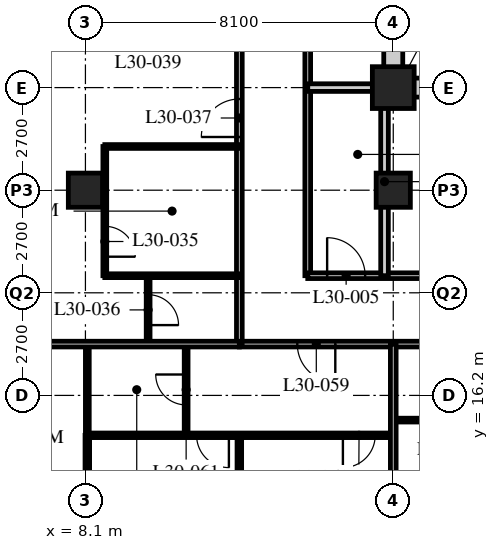
"""IFC4 building model, lengths in metres.
Left out: names, types, materials, properties, quantities, classifications, styles, units other than length and angle.
Written with IfcOpenShell. Run it as: python <this file> out.ifc"""

import sys

from ifc_helpers import new_model, si_unit, direction, frame, frame_2d, origin, origin_2d, place, context, subcontext, project, spatial, rectangle, hollow_rectangle, extrude, element, fill, save


model = new_model("IFC4")
c1 = context("Model", 3, precision=1e-05, world=origin(), true_north=direction((0.0, 1.0)))
c2 = subcontext(c1, "Body", "Model", "MODEL_VIEW")
j1 = project(units=[si_unit("LENGTHUNIT", "METRE"), si_unit("PLANEANGLEUNIT", "RADIAN")], contexts=[c1])
p1 = place(None, origin())
s1 = spatial("IfcSite", under=j1, at=p1, CompositionType="ELEMENT")
p2 = place(p1, origin())
s2 = spatial("IfcBuilding", under=s1, at=p2, CompositionType="ELEMENT")
p3 = place(p2, frame((0.0, 0.0, 120.4)))
s3 = spatial("IfcBuildingStorey", under=s2, at=p3, CompositionType="ELEMENT", Elevation=120.4)
for number, where, z_axis, x_axis in (
    (1, (8.1, 21.6, 0.0), (0.0, 0.0, 1.0), (1.0, 0.0, 0.0)),
    (2, (16.2, 21.6, 0.0), (0.0, 0.0, 1.0), (1.0, 0.0, 0.0)),
):
    element("IfcColumn", number, at=place(p3, frame(where, z_axis=z_axis, x_axis=x_axis)), inside=s3, PredefinedType="COLUMN", context=c2, shape_type="SweptSolid", body=[
        extrude(hollow_rectangle(XDim=0.9, YDim=0.9, WallThickness=0.09, at=origin_2d()), origin(), (0.0, 0.0, 1.0), 3.4),
    ])
p4 = place(p3, frame((16.2, 24.3, 0.0), z_axis=(0.0, 0.0, 1.0), x_axis=(1.0, 0.0, 0.0)))
e3 = element("IfcColumn", 3, at=p4, inside=s3, PredefinedType="COLUMN", context=c2, shape_type="SweptSolid", body=[
    extrude(hollow_rectangle(XDim=1.1, YDim=1.1, WallThickness=0.1, at=origin_2d()), origin(), (0.0, 0.0, 1.0), 3.4),
])
p5 = place(p3, frame((12.15, 17.55, 0.0), z_axis=(0.0, 0.0, 1.0), x_axis=(1.0, 0.0, 0.0)))
e4 = element("IfcWall", 4, at=p5, inside=s3, PredefinedType="PARTITIONING", context=c2, shape_type="SweptSolid", body=[
    extrude(rectangle(XDim=32.4, YDim=0.15, at=frame_2d((16.2, 0.0))), origin(), (0.0, 0.0, 1.0), 3.19),
])
p6 = place(p5, frame((5.95, 0.0, 0.0)))
e5 = element("IfcOpeningElement", 5, at=p6, cuts=e4, PredefinedType="OPENING", context=c2, shape_type="SweptSolid", body=[
    extrude(rectangle(XDim=1.0, YDim=2.1, at=frame_2d((0.5, 1.05))), frame((0.0, 0.085, 0.0), z_axis=(0.0, -1.0, 0.0), x_axis=(1.0, 0.0, 0.0)), (0.0, 0.0, 1.0), 0.17),
])
p7 = place(p5, frame((17.725, 0.0, 0.0)))
e6 = element("IfcOpeningElement", 6, at=p7, cuts=e4, PredefinedType="OPENING", context=c2, shape_type="SweptSolid", body=[
    extrude(rectangle(XDim=1.0, YDim=2.1, at=frame_2d((0.5, 1.05))), frame((0.0, 0.085, 0.0), z_axis=(0.0, -1.0, 0.0), x_axis=(1.0, 0.0, 0.0)), (0.0, 0.0, 1.0), 0.17),
])
p8 = place(p5, frame((26.75, 0.0, 0.0)))
e7 = element("IfcOpeningElement", 7, at=p8, cuts=e4, PredefinedType="OPENING", context=c2, shape_type="SweptSolid", body=[
    extrude(rectangle(XDim=1.0, YDim=2.1, at=frame_2d((0.5, 1.05))), frame((0.0, 0.085, 0.0), z_axis=(0.0, -1.0, 0.0), x_axis=(1.0, 0.0, 0.0)), (0.0, 0.0, 1.0), 0.17),
])
p9 = place(p5, frame((1.525, 0.0, 0.0)))
e8 = element("IfcOpeningElement", 8, at=p9, cuts=e4, PredefinedType="OPENING", context=c2, shape_type="SweptSolid", body=[
    extrude(rectangle(XDim=1.0, YDim=2.1, at=frame_2d((0.5, 1.05))), frame((0.0, 0.085, 0.0), z_axis=(0.0, -1.0, 0.0), x_axis=(1.0, 0.0, 0.0)), (0.0, 0.0, 1.0), 0.17),
])
p10 = place(p5, frame((29.875, 0.0, 0.0)))
e9 = element("IfcOpeningElement", 9, at=p10, cuts=e4, PredefinedType="OPENING", context=c2, shape_type="SweptSolid", body=[
    extrude(rectangle(XDim=1.0, YDim=2.1, at=frame_2d((0.5, 1.05))), frame((0.0, 0.085, 0.0), z_axis=(0.0, -1.0, 0.0), x_axis=(1.0, 0.0, 0.0)), (0.0, 0.0, 1.0), 0.17),
])
p11 = place(p3, frame((12.15, 17.55, 0.0), z_axis=(0.0, 0.0, 1.0), x_axis=(0.0, 1.0, 0.0)))
e10 = element("IfcWall", 10, at=p11, inside=s3, PredefinedType="PARTITIONING", context=c2, shape_type="SweptSolid", body=[
    extrude(rectangle(XDim=28.35, YDim=0.15, at=frame_2d((14.175, 0.0))), origin(), (0.0, 0.0, 1.0), 3.19),
])
p12 = place(p11, frame((5.45, 0.0, 0.0)))
e11 = element("IfcOpeningElement", 11, at=p12, cuts=e10, PredefinedType="OPENING", context=c2, shape_type="SweptSolid", body=[
    extrude(rectangle(XDim=1.0, YDim=2.1, at=frame_2d((0.5, 1.05))), frame((0.0, 0.085, 0.0), z_axis=(0.0, -1.0, 0.0), x_axis=(1.0, 0.0, 0.0)), (0.0, 0.0, 1.0), 0.17),
])
p13 = place(p11, frame((13.55, 0.0, 0.0)))
e12 = element("IfcOpeningElement", 12, at=p13, cuts=e10, PredefinedType="OPENING", context=c2, shape_type="SweptSolid", body=[
    extrude(rectangle(XDim=1.0, YDim=2.1, at=frame_2d((0.5, 1.05))), frame((0.0, 0.085, 0.0), z_axis=(0.0, -1.0, 0.0), x_axis=(1.0, 0.0, 0.0)), (0.0, 0.0, 1.0), 0.17),
])
p14 = place(p11, frame((21.65, 0.0, 0.0)))
e13 = element("IfcOpeningElement", 13, at=p14, cuts=e10, PredefinedType="OPENING", context=c2, shape_type="SweptSolid", body=[
    extrude(rectangle(XDim=1.0, YDim=2.1, at=frame_2d((0.5, 1.05))), frame((0.0, 0.085, 0.0), z_axis=(0.0, -1.0, 0.0), x_axis=(1.0, 0.0, 0.0)), (0.0, 0.0, 1.0), 0.17),
])
p15 = place(p11, frame((26.75, 0.0, 0.0)))
e14 = element("IfcOpeningElement", 14, at=p15, cuts=e10, PredefinedType="OPENING", context=c2, shape_type="SweptSolid", body=[
    extrude(rectangle(XDim=1.0, YDim=2.1, at=frame_2d((0.5, 1.05))), frame((0.0, 0.085, 0.0), z_axis=(0.0, -1.0, 0.0), x_axis=(1.0, 0.0, 0.0)), (0.0, 0.0, 1.0), 0.17),
])
p16 = place(p3, frame((13.95, 44.1, 0.0), z_axis=(0.0, 0.0, 1.0), x_axis=(0.0, -1.0, 0.0)))
e15 = element("IfcWall", 15, at=p16, inside=s3, PredefinedType="PARTITIONING", context=c2, shape_type="SweptSolid", body=[
    extrude(rectangle(XDim=24.75, YDim=0.15, at=frame_2d((12.375, 0.0))), origin(), (0.0, 0.0, 1.0), 3.19),
])
p17 = place(p16, frame((15.25, 0.0, 0.0)))
e16 = element("IfcOpeningElement", 16, at=p17, cuts=e15, PredefinedType="OPENING", context=c2, shape_type="SweptSolid", body=[
    extrude(rectangle(XDim=1.0, YDim=2.1, at=frame_2d((0.5, 1.05))), frame((0.0, 0.085, 0.0), z_axis=(0.0, -1.0, 0.0), x_axis=(1.0, 0.0, 0.0)), (0.0, 0.0, 1.0), 0.17),
])
p18 = place(p16, frame((7.15, 0.0, 0.0)))
e17 = element("IfcOpeningElement", 17, at=p18, cuts=e15, PredefinedType="OPENING", context=c2, shape_type="SweptSolid", body=[
    extrude(rectangle(XDim=1.0, YDim=2.1, at=frame_2d((0.5, 1.05))), frame((0.0, 0.085, 0.0), z_axis=(0.0, -1.0, 0.0), x_axis=(1.0, 0.0, 0.0)), (0.0, 0.0, 1.0), 0.17),
])
p19 = place(p3, frame((13.95, 19.35, 0.0), z_axis=(0.0, 0.0, 1.0), x_axis=(1.0, 0.0, 0.0)))
e18 = element("IfcWall", 18, at=p19, inside=s3, PredefinedType="PARTITIONING", context=c2, shape_type="SweptSolid", body=[
    extrude(rectangle(XDim=13.19, YDim=0.15, at=frame_2d((6.595, 0.0))), origin(), (0.0, 0.0, 1.0), 3.19),
])
p20 = place(p19, frame((0.51, 0.0, 0.0)))
e19 = element("IfcOpeningElement", 19, at=p20, cuts=e18, PredefinedType="OPENING", context=c2, shape_type="SweptSolid", body=[
    extrude(rectangle(XDim=1.0, YDim=2.1, at=frame_2d((0.5, 1.05))), frame((0.0, 0.085, 0.0), z_axis=(0.0, -1.0, 0.0), x_axis=(1.0, 0.0, 0.0)), (0.0, 0.0, 1.0), 0.17),
])
p21 = place(p19, frame((7.11, 0.0, 0.0)))
e20 = element("IfcOpeningElement", 20, at=p21, cuts=e18, PredefinedType="OPENING", context=c2, shape_type="SweptSolid", body=[
    extrude(rectangle(XDim=1.0, YDim=2.1, at=frame_2d((0.5, 1.05))), frame((0.0, 0.085, 0.0), z_axis=(0.0, -1.0, 0.0), x_axis=(1.0, 0.0, 0.0)), (0.0, 0.0, 1.0), 0.17),
])
p22 = place(p3, frame((15.97, 19.35, 0.0), z_axis=(0.0, 0.0, 1.0), x_axis=(0.0, 1.0, 0.0)))
e21 = element("IfcWall", 21, at=p22, inside=s3, PredefinedType="SOLIDWALL", context=c2, shape_type="SweptSolid", body=[
    extrude(rectangle(XDim=4.95, YDim=0.2, at=frame_2d((2.475, 0.0))), origin(), (0.0, 0.0, 1.0), 2.49),
])
p23 = place(p3, frame((13.95, 24.3, 0.0), z_axis=(0.0, 0.0, 1.0), x_axis=(1.0, 0.0, 0.0)))
e22 = element("IfcWall", 22, at=p23, inside=s3, PredefinedType="SOLIDWALL", context=c2, shape_type="SweptSolid", body=[
    extrude(rectangle(XDim=2.25, YDim=0.2, at=frame_2d((1.125, 0.0))), origin(), (0.0, 0.0, 1.0), 3.19),
])
p24 = place(p3, frame((16.2, 15.55, 0.0), z_axis=(0.0, 0.0, 1.0), x_axis=(1.0, 0.0, 0.0)))
e23 = element("IfcWall", 23, at=p24, inside=s3, PredefinedType="PARTITIONING", context=c2, shape_type="SweptSolid", body=[
    extrude(rectangle(XDim=1.5, YDim=0.1, at=frame_2d((0.75, 0.0))), origin(), (0.0, 0.0, 1.0), 3.19),
])
p25 = place(p3, frame((8.61, 19.35, 0.0), z_axis=(0.0, 0.0, 1.0), x_axis=(0.0, 1.0, 0.0)))
e24 = element("IfcWall", 24, at=p25, inside=s3, PredefinedType="PARTITIONING", context=c2, shape_type="SweptSolid", body=[
    extrude(rectangle(XDim=3.4, YDim=0.1, at=frame_2d((1.7, 0.0))), origin(), (0.0, 0.0, 1.0), 3.19),
])
p26 = place(p25, frame((0.5, 0.0, 0.0)))
e25 = element("IfcOpeningElement", 25, at=p26, cuts=e24, PredefinedType="OPENING", context=c2, shape_type="SweptSolid", body=[
    extrude(rectangle(XDim=0.8, YDim=2.1, at=frame_2d((0.4, 1.05))), frame((0.0, 0.06, 0.0), z_axis=(0.0, -1.0, 0.0), x_axis=(1.0, 0.0, 0.0)), (0.0, 0.0, 1.0), 0.12),
])
p27 = place(p3, frame((9.75, 17.55, 0.0), z_axis=(0.0, 0.0, 1.0), x_axis=(0.0, 1.0, 0.0)))
e26 = element("IfcWall", 26, at=p27, inside=s3, PredefinedType="PARTITIONING", context=c2, shape_type="SweptSolid", body=[
    extrude(rectangle(XDim=1.8, YDim=0.1, at=frame_2d((0.9, 0.0))), origin(), (0.0, 0.0, 1.0), 3.19),
])
p28 = place(p27, frame((0.5, 0.0, 0.0)))
e27 = element("IfcOpeningElement", 27, at=p28, cuts=e26, PredefinedType="OPENING", context=c2, shape_type="SweptSolid", body=[
    extrude(rectangle(XDim=0.8, YDim=2.1, at=frame_2d((0.4, 1.05))), frame((0.0, 0.06, 0.0), z_axis=(0.0, -1.0, 0.0), x_axis=(1.0, 0.0, 0.0)), (0.0, 0.0, 1.0), 0.12),
])
for number, where, z_axis, x_axis in (
    (28, (12.15, 19.35, 0.0), (0.0, 0.0, 1.0), (-1.0, 0.0, 0.0)),
    (29, (12.15, 22.75, 0.0), (0.0, 0.0, 1.0), (-1.0, 0.0, 0.0)),
):
    element("IfcWall", number, at=place(p3, frame(where, z_axis=z_axis, x_axis=x_axis)), inside=s3, PredefinedType="PARTITIONING", context=c2, shape_type="SweptSolid", body=[
        extrude(rectangle(XDim=3.54, YDim=0.1, at=frame_2d((1.77, 0.0))), origin(), (0.0, 0.0, 1.0), 3.19),
    ])
p29 = place(p3, frame((10.75, 17.55, 0.0), z_axis=(0.0, 0.0, 1.0), x_axis=(0.0, -1.0, 0.0)))
e30 = element("IfcWall", 30, at=p29, inside=s3, PredefinedType="PARTITIONING", context=c2, shape_type="SweptSolid", body=[
    extrude(rectangle(XDim=2.4, YDim=0.1, at=frame_2d((1.2, 0.0))), origin(), (0.0, 0.0, 1.0), 3.19),
])
p30 = place(p29, frame((0.8, 0.0, 0.0)))
e31 = element("IfcOpeningElement", 31, at=p30, cuts=e30, PredefinedType="OPENING", context=c2, shape_type="SweptSolid", body=[
    extrude(rectangle(XDim=0.8, YDim=2.1, at=frame_2d((0.4, 1.05))), frame((0.0, 0.06, 0.0), z_axis=(0.0, -1.0, 0.0), x_axis=(1.0, 0.0, 0.0)), (0.0, 0.0, 1.0), 0.12),
])
p31 = place(p3, frame((8.15, 17.55, 0.0), z_axis=(0.0, 0.0, 1.0), x_axis=(0.0, -1.0, 0.0)))
e32 = element("IfcWall", 32, at=p31, inside=s3, PredefinedType="PARTITIONING", context=c2, shape_type="SweptSolid", body=[
    extrude(rectangle(XDim=2.4, YDim=0.1, at=frame_2d((1.2, 0.0))), origin(), (0.0, 0.0, 1.0), 2.578),
])
p32 = place(p3, frame((8.15, 15.15, 0.0), z_axis=(0.0, 0.0, 1.0), x_axis=(1.0, 0.0, 0.0)))
e33 = element("IfcWall", 33, at=p32, inside=s3, PredefinedType="PARTITIONING", context=c2, shape_type="SweptSolid", body=[
    extrude(rectangle(XDim=8.05, YDim=0.12, at=frame_2d((4.025, 0.0))), origin(), (0.0, 0.0, 1.0), 3.19),
])
p33 = place(p32, frame((6.725, 0.0, 0.0)))
e34 = element("IfcOpeningElement", 34, at=p33, cuts=e33, PredefinedType="OPENING", context=c2, shape_type="SweptSolid", body=[
    extrude(rectangle(XDim=0.85, YDim=2.1, at=frame_2d((0.425, 1.05))), frame((0.0, 0.07, 0.0), z_axis=(0.0, -1.0, 0.0), x_axis=(1.0, 0.0, 0.0)), (0.0, 0.0, 1.0), 0.14),
])
p34 = place(p32, frame((2.875, 0.0, 0.0)))
e35 = element("IfcOpeningElement", 35, at=p34, cuts=e33, PredefinedType="OPENING", context=c2, shape_type="SweptSolid", body=[
    extrude(rectangle(XDim=0.85, YDim=2.1, at=frame_2d((0.425, 1.05))), frame((0.0, 0.07, 0.0), z_axis=(0.0, -1.0, 0.0), x_axis=(1.0, 0.0, 0.0)), (0.0, 0.0, 1.0), 0.14),
])
p35 = place(p3, frame((12.15, 15.15, 0.0), z_axis=(0.0, 0.0, 1.0), x_axis=(0.0, -1.0, 0.0)))
e36 = element("IfcWall", 36, at=p35, inside=s3, PredefinedType="PARTITIONING", context=c2, shape_type="SweptSolid", body=[
    extrude(rectangle(XDim=9.45, YDim=0.12, at=frame_2d((4.725, 0.0))), origin(), (0.0, 0.0, 1.0), 3.19),
])
p36 = place(p3, frame((0.3, 17.55, 0.0), z_axis=(0.0, 0.0, 1.0), x_axis=(1.0, 0.0, 0.0)))
e37 = element("IfcWall", 37, at=p36, inside=s3, PredefinedType="PARTITIONING", context=c2, shape_type="SweptSolid", body=[
    extrude(rectangle(XDim=11.85, YDim=0.15, at=frame_2d((5.925, 0.0))), origin(), (0.0, 0.0, 1.0), 3.19),
])
p37 = place(p3, frame((16.2, 17.55, 0.0), z_axis=(0.0, 0.0, 1.0), x_axis=(0.0, -1.0, 0.0)))
e38 = element("IfcWall", 38, at=p37, inside=s3, PredefinedType="PARTITIONING", context=c2, shape_type="SweptSolid", body=[
    extrude(rectangle(XDim=11.85, YDim=0.15, at=frame_2d((5.925, 0.0))), origin(), (0.0, 0.0, 1.0), 2.578),
])
p38 = place(p3, frame((8.15, 15.15, 0.0), z_axis=(0.0, 0.0, 1.0), x_axis=(0.0, -1.0, 0.0)))
e39 = element("IfcWall", 39, at=p38, inside=s3, PredefinedType="PARTITIONING", context=c2, shape_type="SweptSolid", body=[
    extrude(rectangle(XDim=1.2, YDim=0.12, at=frame_2d((0.6, 0.0))), origin(), (0.0, 0.0, 1.0), 2.578),
])
p39 = place(p3, frame((15.95, 24.3, 0.0), z_axis=(0.0, 0.0, 1.0), x_axis=(1.0, 0.0, 0.0)))
e40 = element("IfcWall", 40, at=p39, inside=s3, PredefinedType="SOLIDWALL", context=c2, shape_type="SweptSolid", body=[
    extrude(rectangle(XDim=24.8, YDim=0.5, at=frame_2d((12.4, 0.0))), origin(), (0.0, 0.0, 1.0), 2.54),
])
p40 = place(p39, frame((11.5, 0.0, 0.0)))
e41 = element("IfcOpeningElement", 41, at=p40, cuts=e40, PredefinedType="OPENING", context=c2, shape_type="SweptSolid", body=[
    extrude(rectangle(XDim=1.8, YDim=2.4, at=frame_2d((0.9, 1.2))), frame((0.0, 0.26, 0.0), z_axis=(0.0, -1.0, 0.0), x_axis=(1.0, 0.0, 0.0)), (0.0, 0.0, 1.0), 0.52),
])
p41 = place(p3, frame((16.2, 24.55, 0.0), z_axis=(0.0, 0.0, 1.0), x_axis=(0.0, 1.0, 0.0)))
e42 = element("IfcWall", 42, at=p41, inside=s3, PredefinedType="SOLIDWALL", context=c2, shape_type="SweptSolid", body=[
    extrude(rectangle(XDim=15.7, YDim=0.5, at=frame_2d((7.85, 0.0))), origin(), (0.0, 0.0, 1.0), 2.578),
])
p42 = place(p20, origin())
e43 = element("IfcDoor", 43, at=p42, inside=s3, OperationType="SINGLE_SWING_LEFT", PredefinedType="DOOR", context=c2, shape_type="SweptSolid", body=[
    extrude(rectangle(XDim=1.0, YDim=2.1, at=frame_2d((0.5, 1.05))), frame((0.0, 0.025, 0.0), z_axis=(0.0, -1.0, 0.0), x_axis=(1.0, 0.0, 0.0)), (0.0, 0.0, 1.0), 0.05),
])
fill(e19, e43)
p43 = place(p26, origin())
e44 = element("IfcDoor", 44, at=p43, inside=s3, OperationType="SINGLE_SWING_RIGHT", PredefinedType="DOOR", context=c2, shape_type="SweptSolid", body=[
    extrude(rectangle(XDim=0.8, YDim=2.1, at=frame_2d((0.4, 1.05))), frame((0.0, 0.025, 0.0), z_axis=(0.0, -1.0, 0.0), x_axis=(1.0, 0.0, 0.0)), (0.0, 0.0, 1.0), 0.05),
])
fill(e25, e44)
p44 = place(p28, origin())
e45 = element("IfcDoor", 45, at=p44, inside=s3, OperationType="SINGLE_SWING_RIGHT", PredefinedType="DOOR", context=c2, shape_type="SweptSolid", body=[
    extrude(rectangle(XDim=0.8, YDim=2.1, at=frame_2d((0.4, 1.05))), frame((0.0, 0.025, 0.0), z_axis=(0.0, -1.0, 0.0), x_axis=(1.0, 0.0, 0.0)), (0.0, 0.0, 1.0), 0.05),
])
fill(e27, e45)
p45 = place(p12, origin())
e46 = element("IfcDoor", 46, at=p45, inside=s3, OperationType="SINGLE_SWING_LEFT", PredefinedType="DOOR", context=c2, shape_type="SweptSolid", body=[
    extrude(rectangle(XDim=1.0, YDim=2.1, at=frame_2d((0.5, 1.05))), frame((0.0, 0.025, 0.0), z_axis=(0.0, -1.0, 0.0), x_axis=(1.0, 0.0, 0.0)), (0.0, 0.0, 1.0), 0.05),
])
fill(e11, e46)
p46 = place(p9, origin())
e47 = element("IfcDoor", 47, at=p46, inside=s3, OperationType="SINGLE_SWING_LEFT", PredefinedType="DOOR", context=c2, shape_type="SweptSolid", body=[
    extrude(rectangle(XDim=1.0, YDim=2.1, at=frame_2d((0.5, 1.05))), frame((0.0, 0.025, 0.0), z_axis=(0.0, -1.0, 0.0), x_axis=(1.0, 0.0, 0.0)), (0.0, 0.0, 1.0), 0.05),
])
fill(e8, e47)
p47 = place(p33, origin())
e48 = element("IfcDoor", 48, at=p47, inside=s3, OperationType="SINGLE_SWING_RIGHT", PredefinedType="DOOR", context=c2, shape_type="SweptSolid", body=[
    extrude(rectangle(XDim=0.85, YDim=2.1, at=frame_2d((0.425, 1.05))), frame((0.0, 0.025, 0.0), z_axis=(0.0, -1.0, 0.0), x_axis=(1.0, 0.0, 0.0)), (0.0, 0.0, 1.0), 0.05),
])
fill(e34, e48)
p48 = place(p30, origin())
e49 = element("IfcDoor", 49, at=p48, inside=s3, OperationType="SINGLE_SWING_RIGHT", PredefinedType="DOOR", context=c2, shape_type="SweptSolid", body=[
    extrude(rectangle(XDim=0.8, YDim=2.1, at=frame_2d((0.4, 1.05))), frame((0.0, 0.025, 0.0), z_axis=(0.0, -1.0, 0.0), x_axis=(1.0, 0.0, 0.0)), (0.0, 0.0, 1.0), 0.05),
])
fill(e31, e49)
p49 = place(p34, origin())
e50 = element("IfcDoor", 50, at=p49, inside=s3, OperationType="SINGLE_SWING_LEFT", PredefinedType="DOOR", context=c2, shape_type="SweptSolid", body=[
    extrude(rectangle(XDim=0.85, YDim=2.1, at=frame_2d((0.425, 1.05))), frame((0.0, 0.025, 0.0), z_axis=(0.0, -1.0, 0.0), x_axis=(1.0, 0.0, 0.0)), (0.0, 0.0, 1.0), 0.05),
])
fill(e35, e50)
save(model, sys.argv[1])
